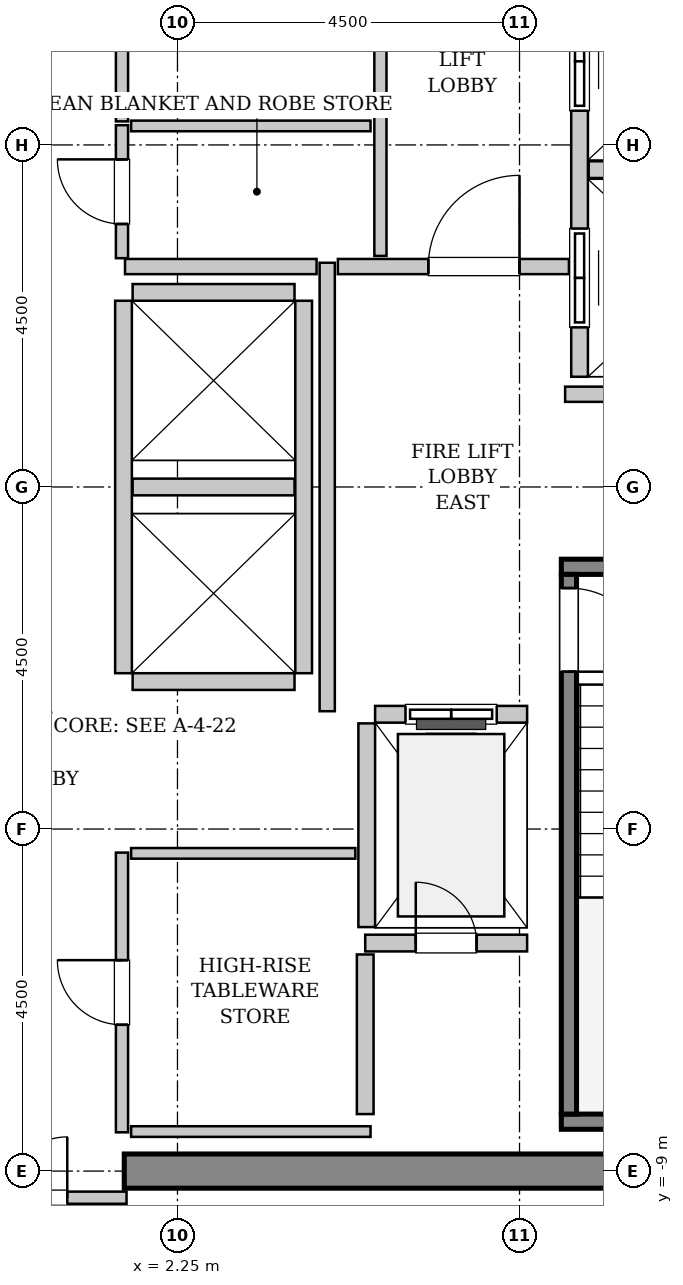
"""IFC4 building model, lengths in metres.
Left out: names, types, materials, properties, quantities, classifications, styles, units other than length and angle.
Written with IfcOpenShell. Run it as: python <this file> out.ifc"""

import sys

from ifc_helpers import new_model, si_unit, direction, frame, frame_2d, origin, place, context, subcontext, project, spatial, rectangle, extrude, source, transform, mapped, element, fill, save


model = new_model("IFC4")
c1 = context("Model", 3, precision=1e-05, world=origin(), true_north=direction((0.0, 1.0)))
c2 = subcontext(c1, "Body", "Model", "MODEL_VIEW")
j1 = project(units=[si_unit("LENGTHUNIT", "METRE"), si_unit("PLANEANGLEUNIT", "RADIAN")], contexts=[c1])
p1 = place(None, origin())
s1 = spatial("IfcSite", under=j1, at=p1, CompositionType="ELEMENT")
p2 = place(p1, origin())
s2 = spatial("IfcBuilding", under=s1, at=p2, CompositionType="ELEMENT")
p3 = place(p2, frame((0.0, 0.0, 314.0)))
s3 = spatial("IfcBuildingStorey", under=s2, at=p3, CompositionType="ELEMENT", Elevation=314.0)
m1 = source(origin(), c2, "Body", "SweptSolid", [
    extrude(rectangle(XDim=9.925, YDim=0.45, at=frame_2d((4.962, 0.0))), origin(), (0.0, 0.0, 1.0), 3.8),
])
p4 = place(p3, frame((1.55, -9.0, 0.0), z_axis=(0.0, 0.0, 1.0), x_axis=(1.0, 0.0, 0.0)))
e1 = element("IfcWall", 1, at=p4, inside=s3, PredefinedType="SHEAR", context=c2, shape_type="MappedRepresentation", body=[
    mapped(m1, transform((0.0, 0.0, 0.0), x_axis=(1.0, 0.0, 0.0), y_axis=(0.0, 1.0, 0.0), z_axis=(0.0, 0.0, 1.0), scale=1.0)),
])
m2 = source(origin(), c2, "Body", "SweptSolid", [
    extrude(rectangle(XDim=3.4, YDim=0.2, at=frame_2d((1.7, 0.0))), origin(), (0.0, 0.0, 1.0), 3.8),
])
p5 = place(p3, frame((7.3, -1.05, 0.0), z_axis=(0.0, 0.0, 1.0), x_axis=(1.0, 0.0, 0.0)))
e2 = element("IfcWall", 2, at=p5, inside=s3, PredefinedType="SOLIDWALL", context=c2, shape_type="MappedRepresentation", body=[
    mapped(m2, transform((0.0, 0.0, 0.0), x_axis=(1.0, 0.0, 0.0), y_axis=(0.0, 1.0, 0.0), z_axis=(0.0, 0.0, 1.0), scale=1.0)),
])
m3 = source(origin(), c2, "Body", "SweptSolid", [
    extrude(rectangle(XDim=3.73, YDim=0.2, at=frame_2d((1.865, 0.0))), origin(), (0.0, 0.0, 1.0), 3.8),
])
p6 = place(p3, frame((7.3, -8.35, 0.0), z_axis=(0.0, 0.0, 1.0), x_axis=(1.0, 0.0, 0.0)))
e3 = element("IfcWall", 3, at=p6, inside=s3, PredefinedType="SOLIDWALL", context=c2, shape_type="MappedRepresentation", body=[
    mapped(m3, transform((0.0, 0.0, 0.0), x_axis=(1.0, 0.0, 0.0), y_axis=(0.0, 1.0, 0.0), z_axis=(0.0, 0.0, 1.0), scale=1.0)),
])
m4 = source(origin(), c2, "Body", "SweptSolid", [
    extrude(rectangle(XDim=7.1, YDim=0.2, at=frame_2d((3.55, 0.0))), origin(), (0.0, 0.0, 1.0), 3.8),
])
p7 = place(p3, frame((7.4, -1.15, 0.0), z_axis=(0.0, 0.0, 1.0), x_axis=(0.0, -1.0, 0.0)))
e4 = element("IfcWall", 4, at=p7, inside=s3, PredefinedType="SOLIDWALL", context=c2, shape_type="MappedRepresentation", body=[
    mapped(m4, transform((0.0, 0.0, 0.0), x_axis=(1.0, 0.0, 0.0), y_axis=(0.0, 1.0, 0.0), z_axis=(0.0, 0.0, 1.0), scale=1.0)),
])
p8 = place(p7, frame((0.18, 0.0, 0.0)))
e5 = element("IfcOpeningElement", 5, at=p8, cuts=e4, PredefinedType="OPENING", context=c2, shape_type="SweptSolid", body=[
    extrude(rectangle(XDim=1.1, YDim=2.15, at=frame_2d((0.55, 1.075))), frame((0.0, 0.11, 0.0), z_axis=(0.0, -1.0, 0.0), x_axis=(1.0, 0.0, 0.0)), (0.0, 0.0, 1.0), 0.22),
])
m5 = source(origin(), c2, "Body", "SweptSolid", [
    extrude(rectangle(XDim=2.0, YDim=0.22, at=frame_2d((1.0, 0.0))), origin(), (0.0, 0.0, 1.0), 3.485),
])
p9 = place(p3, frame((6.85, -2.99, 0.0), z_axis=(0.0, 0.0, 1.0), x_axis=(-1.0, 0.0, 0.0)))
e6 = element("IfcWall", 6, at=p9, inside=s3, PredefinedType="SOLIDWALL", context=c2, shape_type="MappedRepresentation", body=[
    mapped(m5, transform((0.0, 0.0, 0.0), x_axis=(1.0, 0.0, 0.0), y_axis=(0.0, 1.0, 0.0), z_axis=(0.0, 0.0, 1.0), scale=1.0)),
])
p10 = place(p9, frame((0.4, 0.0, 0.0)))
e7 = element("IfcOpeningElement", 7, at=p10, cuts=e6, PredefinedType="OPENING", context=c2, shape_type="SweptSolid", body=[
    extrude(rectangle(XDim=1.2, YDim=2.2, at=frame_2d((0.6, 1.1))), frame((0.0, 0.12, 0.0), z_axis=(0.0, -1.0, 0.0), x_axis=(1.0, 0.0, 0.0)), (0.0, 0.0, 1.0), 0.24),
])
m6 = source(origin(), c2, "Body", "SweptSolid", [
    extrude(rectangle(XDim=2.68, YDim=0.22, at=frame_2d((1.34, 0.0))), origin(), (0.0, 0.0, 1.0), 3.485),
])
p11 = place(p3, frame((4.74, -3.11, 0.0), z_axis=(0.0, 0.0, 1.0), x_axis=(0.0, -1.0, 0.0)))
e8 = element("IfcWall", 8, at=p11, inside=s3, PredefinedType="SOLIDWALL", context=c2, shape_type="MappedRepresentation", body=[
    mapped(m6, transform((0.0, 0.0, 0.0), x_axis=(1.0, 0.0, 0.0), y_axis=(0.0, 1.0, 0.0), z_axis=(0.0, 0.0, 1.0), scale=1.0)),
])
m7 = source(origin(), c2, "Body", "SweptSolid", [
    extrude(rectangle(XDim=5.45, YDim=0.22, at=frame_2d((2.725, 0.0))), origin(), (0.0, 0.0, 1.0), 3.485),
])
p12 = place(p3, frame((7.54, 6.9, 0.0), z_axis=(0.0, 0.0, 1.0), x_axis=(0.0, -1.0, 0.0)))
e9 = element("IfcWall", 9, at=p12, inside=s3, PredefinedType="SOLIDWALL", context=c2, shape_type="MappedRepresentation", body=[
    mapped(m7, transform((0.0, 0.0, 0.0), x_axis=(1.0, 0.0, 0.0), y_axis=(0.0, 1.0, 0.0), z_axis=(0.0, 0.0, 1.0), scale=1.0)),
])
p13 = place(p12, frame((3.5, 0.0, 0.0)))
e10 = element("IfcOpeningElement", 10, at=p13, cuts=e9, PredefinedType="OPENING", context=c2, shape_type="SweptSolid", body=[
    extrude(rectangle(XDim=1.3, YDim=2.3, at=frame_2d((0.65, 1.15))), frame((0.0, 0.12, 0.0), z_axis=(0.0, -1.0, 0.0), x_axis=(1.0, 0.0, 0.0)), (0.0, 0.0, 1.0), 0.24),
])
p14 = place(p12, frame((0.65, 0.0, 0.0)))
e11 = element("IfcOpeningElement", 11, at=p14, cuts=e9, PredefinedType="OPENING", context=c2, shape_type="SweptSolid", body=[
    extrude(rectangle(XDim=1.3, YDim=2.3, at=frame_2d((0.65, 1.15))), frame((0.0, 0.12, 0.0), z_axis=(0.0, -1.0, 0.0), x_axis=(1.0, 0.0, 0.0)), (0.0, 0.0, 1.0), 0.24),
])
m8 = source(origin(), c2, "Body", "SweptSolid", [
    extrude(rectangle(XDim=2.78, YDim=0.22, at=frame_2d((1.39, 0.0))), origin(), (0.0, 0.0, 1.0), 3.485),
])
p15 = place(p3, frame((7.66, 4.175, 0.0), z_axis=(0.0, 0.0, 1.0), x_axis=(1.0, 0.0, 0.0)))
e12 = element("IfcWall", 12, at=p15, inside=s3, PredefinedType="SOLIDWALL", context=c2, shape_type="MappedRepresentation", body=[
    mapped(m8, transform((0.0, 0.0, 0.0), x_axis=(1.0, 0.0, 0.0), y_axis=(0.0, 1.0, 0.0), z_axis=(0.0, 0.0, 1.0), scale=1.0)),
])
m9 = source(origin(), c2, "Body", "SweptSolid", [
    extrude(rectangle(XDim=4.9, YDim=0.22, at=frame_2d((2.45, 0.0))), origin(), (0.0, 0.0, 1.0), 3.485),
])
for number, where, z_axis, x_axis in (
    (13, (1.54, 2.45, 0.0), (0.0, 0.0, 1.0), (0.0, -1.0, 0.0)),
    (14, (3.91, -2.45, 0.0), (0.0, 0.0, 1.0), (0.0, 1.0, 0.0)),
):
    element("IfcWall", number, at=place(p3, frame(where, z_axis=z_axis, x_axis=x_axis)), inside=s3, PredefinedType="SOLIDWALL", context=c2, shape_type="MappedRepresentation", body=[
        mapped(m9, transform((0.0, 0.0, 0.0), x_axis=(1.0, 0.0, 0.0), y_axis=(0.0, 1.0, 0.0), z_axis=(0.0, 0.0, 1.0), scale=1.0)),
    ])
m10 = source(origin(), c2, "Body", "SweptSolid", [
    extrude(rectangle(XDim=2.13, YDim=0.22, at=frame_2d((1.065, 0.0))), origin(), (0.0, 0.0, 1.0), 3.485),
])
for number, where, z_axis, x_axis in (
    (15, (1.66, -2.56, 0.0), (0.0, 0.0, 1.0), (1.0, 0.0, 0.0)),
    (16, (1.66, 0.0, 0.0), (0.0, 0.0, 1.0), (1.0, 0.0, 0.0)),
    (17, (3.79, 2.56, 0.0), (0.0, 0.0, 1.0), (-1.0, 0.0, 0.0)),
):
    element("IfcWall", number, at=place(p3, frame(where, z_axis=z_axis, x_axis=x_axis)), inside=s3, PredefinedType="SOLIDWALL", context=c2, shape_type="MappedRepresentation", body=[
        mapped(m10, transform((0.0, 0.0, 0.0), x_axis=(1.0, 0.0, 0.0), y_axis=(0.0, 1.0, 0.0), z_axis=(0.0, 0.0, 1.0), scale=1.0)),
    ])
p16 = place(p3, frame((4.72, -6.0, 0.0), z_axis=(0.0, 0.0, 1.0), x_axis=(1.0, 0.0, 0.0)))
e18 = element("IfcWall", 18, at=p16, inside=s3, PredefinedType="SOLIDWALL", context=c2, shape_type="MappedRepresentation", body=[
    mapped(m10, transform((0.0, 0.0, 0.0), x_axis=(1.0, 0.0, 0.0), y_axis=(0.0, 1.0, 0.0), z_axis=(0.0, 0.0, 1.0), scale=1.0)),
])
p17 = place(p16, frame((0.665, 0.0, 0.0)))
e19 = element("IfcOpeningElement", 19, at=p17, cuts=e18, PredefinedType="OPENING", context=c2, shape_type="SweptSolid", body=[
    extrude(rectangle(XDim=0.8, YDim=2.0, at=frame_2d((0.4, 1.0))), frame((0.0, 0.12, 0.0), z_axis=(0.0, -1.0, 0.0), x_axis=(1.0, 0.0, 0.0)), (0.0, 0.0, 1.0), 0.24),
])
m11 = source(origin(), c2, "Body", "SweptSolid", [
    extrude(rectangle(XDim=2.1, YDim=0.22, at=frame_2d((1.05, 0.0))), origin(), (0.0, 0.0, 1.0), 3.485),
])
p18 = place(p3, frame((4.72, -8.25, 0.0), z_axis=(0.0, 0.0, 1.0), x_axis=(0.0, 1.0, 0.0)))
e20 = element("IfcWall", 20, at=p18, inside=s3, PredefinedType="SOLIDWALL", context=c2, shape_type="MappedRepresentation", body=[
    mapped(m11, transform((0.0, 0.0, 0.0), x_axis=(1.0, 0.0, 0.0), y_axis=(0.0, 1.0, 0.0), z_axis=(0.0, 0.0, 1.0), scale=1.0)),
])
m12 = source(origin(), c2, "Body", "SweptSolid", [
    extrude(rectangle(XDim=5.9, YDim=0.2, at=frame_2d((2.95, 0.0))), origin(), (0.0, 0.0, 1.0), 3.485),
])
p19 = place(p3, frame((4.22, -2.95, 0.0), z_axis=(0.0, 0.0, 1.0), x_axis=(0.0, 1.0, 0.0)))
e21 = element("IfcWall", 21, at=p19, inside=s3, PredefinedType="PARTITIONING", context=c2, shape_type="MappedRepresentation", body=[
    mapped(m12, transform((0.0, 0.0, 0.0), x_axis=(1.0, 0.0, 0.0), y_axis=(0.0, 1.0, 0.0), z_axis=(0.0, 0.0, 1.0), scale=1.0)),
])
m13 = source(origin(), c2, "Body", "SweptSolid", [
    extrude(rectangle(XDim=2.52, YDim=0.2, at=frame_2d((1.26, 0.0))), origin(), (0.0, 0.0, 1.0), 3.485),
])
p20 = place(p3, frame((1.56, 2.9, 0.0), z_axis=(0.0, 0.0, 1.0), x_axis=(1.0, 0.0, 0.0)))
e22 = element("IfcWall", 22, at=p20, inside=s3, PredefinedType="PARTITIONING", context=c2, shape_type="MappedRepresentation", body=[
    mapped(m13, transform((0.0, 0.0, 0.0), x_axis=(1.0, 0.0, 0.0), y_axis=(0.0, 1.0, 0.0), z_axis=(0.0, 0.0, 1.0), scale=1.0)),
])
m14 = source(origin(), c2, "Body", "SweptSolid", [
    extrude(rectangle(XDim=3.04, YDim=0.2, at=frame_2d((1.52, 0.0))), origin(), (0.0, 0.0, 1.0), 3.485),
])
p21 = place(p3, frame((4.36, 2.9, 0.0), z_axis=(0.0, 0.0, 1.0), x_axis=(1.0, 0.0, 0.0)))
e23 = element("IfcWall", 23, at=p21, inside=s3, PredefinedType="PARTITIONING", context=c2, shape_type="MappedRepresentation", body=[
    mapped(m14, transform((0.0, 0.0, 0.0), x_axis=(1.0, 0.0, 0.0), y_axis=(0.0, 1.0, 0.0), z_axis=(0.0, 0.0, 1.0), scale=1.0)),
])
p22 = place(p21, frame((1.19, 0.0, 0.0)))
e24 = element("IfcOpeningElement", 24, at=p22, cuts=e23, PredefinedType="OPENING", context=c2, shape_type="SweptSolid", body=[
    extrude(rectangle(XDim=1.2, YDim=2.15, at=frame_2d((0.6, 1.075))), frame((0.0, 0.11, 0.0), z_axis=(0.0, -1.0, 0.0), x_axis=(1.0, 0.0, 0.0)), (0.0, 0.0, 1.0), 0.22),
])
m15 = source(origin(), c2, "Body", "SweptSolid", [
    extrude(rectangle(XDim=4.11, YDim=0.2, at=frame_2d((2.055, 0.0))), origin(), (0.0, 0.0, 1.0), 3.485),
])
p23 = place(p3, frame((7.35, 1.22, 0.0), z_axis=(0.0, 0.0, 1.0), x_axis=(1.0, 0.0, 0.0)))
e25 = element("IfcWall", 25, at=p23, inside=s3, PredefinedType="PARTITIONING", context=c2, shape_type="MappedRepresentation", body=[
    mapped(m15, transform((0.0, 0.0, 0.0), x_axis=(1.0, 0.0, 0.0), y_axis=(0.0, 1.0, 0.0), z_axis=(0.0, 0.0, 1.0), scale=1.0)),
])
m16 = source(origin(), c2, "Body", "SweptSolid", [
    extrude(rectangle(XDim=3.16, YDim=0.16, at=frame_2d((1.58, 0.0))), origin(), (0.0, 0.0, 1.0), 2.575),
])
p24 = place(p3, frame((-1.58, -9.35, 0.0), z_axis=(0.0, 0.0, 1.0), x_axis=(1.0, 0.0, 0.0)))
e26 = element("IfcWall", 26, at=p24, inside=s3, PredefinedType="PARTITIONING", context=c2, shape_type="MappedRepresentation", body=[
    mapped(m16, transform((0.0, 0.0, 0.0), x_axis=(1.0, 0.0, 0.0), y_axis=(0.0, 1.0, 0.0), z_axis=(0.0, 0.0, 1.0), scale=1.0)),
])
p25 = place(p24, frame((0.78, 0.0, 0.0)))
e27 = element("IfcOpeningElement", 27, at=p25, cuts=e26, PredefinedType="OPENING", context=c2, shape_type="SweptSolid", body=[
    extrude(rectangle(XDim=1.6, YDim=2.3, at=frame_2d((0.8, 1.15))), frame((0.0, 0.09, 0.0), z_axis=(0.0, -1.0, 0.0), x_axis=(1.0, 0.0, 0.0)), (0.0, 0.0, 1.0), 0.18),
])
m17 = source(origin(), c2, "Body", "SweptSolid", [
    extrude(rectangle(XDim=5.45, YDim=0.16, at=frame_2d((2.725, 0.0))), origin(), (0.0, 0.0, 1.0), 3.485),
])
p26 = place(p3, frame((4.92, 3.04, 0.0), z_axis=(0.0, 0.0, 1.0), x_axis=(0.0, 1.0, 0.0)))
e28 = element("IfcWall", 28, at=p26, inside=s3, PredefinedType="PARTITIONING", context=c2, shape_type="MappedRepresentation", body=[
    mapped(m17, transform((0.0, 0.0, 0.0), x_axis=(1.0, 0.0, 0.0), y_axis=(0.0, 1.0, 0.0), z_axis=(0.0, 0.0, 1.0), scale=1.0)),
])
m18 = source(origin(), c2, "Body", "SweptSolid", [
    extrude(rectangle(XDim=1.75, YDim=0.16, at=frame_2d((0.875, 0.0))), origin(), (0.0, 0.0, 1.0), 3.485),
])
p27 = place(p3, frame((1.52, 3.01, 0.0), z_axis=(0.0, 0.0, 1.0), x_axis=(0.0, 1.0, 0.0)))
e29 = element("IfcWall", 29, at=p27, inside=s3, PredefinedType="PARTITIONING", context=c2, shape_type="MappedRepresentation", body=[
    mapped(m18, transform((0.0, 0.0, 0.0), x_axis=(1.0, 0.0, 0.0), y_axis=(0.0, 1.0, 0.0), z_axis=(0.0, 0.0, 1.0), scale=1.0)),
])
p28 = place(p27, frame((0.45, 0.0, 0.0)))
e30 = element("IfcOpeningElement", 30, at=p28, cuts=e29, PredefinedType="OPENING", context=c2, shape_type="SweptSolid", body=[
    extrude(rectangle(XDim=0.85, YDim=2.1, at=frame_2d((0.425, 1.05))), frame((0.0, 0.09, 0.0), z_axis=(0.0, -1.0, 0.0), x_axis=(1.0, 0.0, 0.0)), (0.0, 0.0, 1.0), 0.18),
])
m19 = source(origin(), c2, "Body", "SweptSolid", [
    extrude(rectangle(XDim=3.15, YDim=0.14, at=frame_2d((1.575, 0.0))), origin(), (0.0, 0.0, 1.0), 3.485),
])
p29 = place(p3, frame((1.64, 4.75, 0.0), z_axis=(0.0, 0.0, 1.0), x_axis=(1.0, 0.0, 0.0)))
e31 = element("IfcWall", 31, at=p29, inside=s3, PredefinedType="PARTITIONING", context=c2, shape_type="MappedRepresentation", body=[
    mapped(m19, transform((0.0, 0.0, 0.0), x_axis=(1.0, 0.0, 0.0), y_axis=(0.0, 1.0, 0.0), z_axis=(0.0, 0.0, 1.0), scale=1.0)),
])
m20 = source(origin(), c2, "Body", "SweptSolid", [
    extrude(rectangle(XDim=3.68, YDim=0.16, at=frame_2d((1.84, 0.0))), origin(), (0.0, 0.0, 1.0), 3.485),
])
p30 = place(p3, frame((1.52, 4.81, 0.0), z_axis=(0.0, 0.0, 1.0), x_axis=(0.0, 1.0, 0.0)))
e32 = element("IfcWall", 32, at=p30, inside=s3, PredefinedType="PARTITIONING", context=c2, shape_type="MappedRepresentation", body=[
    mapped(m20, transform((0.0, 0.0, 0.0), x_axis=(1.0, 0.0, 0.0), y_axis=(0.0, 1.0, 0.0), z_axis=(0.0, 0.0, 1.0), scale=1.0)),
])
p31 = place(p30, frame((1.415, 0.0, 0.0)))
e33 = element("IfcOpeningElement", 33, at=p31, cuts=e32, PredefinedType="OPENING", context=c2, shape_type="SweptSolid", body=[
    extrude(rectangle(XDim=0.85, YDim=2.1, at=frame_2d((0.425, 1.05))), frame((0.0, 0.09, 0.0), z_axis=(0.0, -1.0, 0.0), x_axis=(1.0, 0.0, 0.0)), (0.0, 0.0, 1.0), 0.18),
])
p32 = place(p3, frame((1.52, -8.49, 0.0), z_axis=(0.0, 0.0, 1.0), x_axis=(0.0, 1.0, 0.0)))
e34 = element("IfcWall", 34, at=p32, inside=s3, PredefinedType="PARTITIONING", context=c2, shape_type="MappedRepresentation", body=[
    mapped(m20, transform((0.0, 0.0, 0.0), x_axis=(1.0, 0.0, 0.0), y_axis=(0.0, 1.0, 0.0), z_axis=(0.0, 0.0, 1.0), scale=1.0)),
])
p33 = place(p32, frame((1.415, 0.0, 0.0)))
e35 = element("IfcOpeningElement", 35, at=p33, cuts=e34, PredefinedType="OPENING", context=c2, shape_type="SweptSolid", body=[
    extrude(rectangle(XDim=0.85, YDim=2.1, at=frame_2d((0.425, 1.05))), frame((0.0, 0.09, 0.0), z_axis=(0.0, -1.0, 0.0), x_axis=(1.0, 0.0, 0.0)), (0.0, 0.0, 1.0), 0.18),
])
m21 = source(origin(), c2, "Body", "SweptSolid", [
    extrude(rectangle(XDim=2.95, YDim=0.14, at=frame_2d((1.475, 0.0))), origin(), (0.0, 0.0, 1.0), 3.485),
])
p34 = place(p3, frame((1.64, -4.82, 0.0), z_axis=(0.0, 0.0, 1.0), x_axis=(1.0, 0.0, 0.0)))
e36 = element("IfcWall", 36, at=p34, inside=s3, PredefinedType="PARTITIONING", context=c2, shape_type="MappedRepresentation", body=[
    mapped(m21, transform((0.0, 0.0, 0.0), x_axis=(1.0, 0.0, 0.0), y_axis=(0.0, 1.0, 0.0), z_axis=(0.0, 0.0, 1.0), scale=1.0)),
])
p35 = place(p3, frame((1.64, -8.48, 0.0), z_axis=(0.0, 0.0, 1.0), x_axis=(1.0, 0.0, 0.0)))
e37 = element("IfcWall", 37, at=p35, inside=s3, PredefinedType="PARTITIONING", context=c2, shape_type="MappedRepresentation", body=[
    mapped(m19, transform((0.0, 0.0, 0.0), x_axis=(1.0, 0.0, 0.0), y_axis=(0.0, 1.0, 0.0), z_axis=(0.0, 0.0, 1.0), scale=1.0)),
])
m22 = source(origin(), c2, "Body", "SweptSolid", [
    extrude(rectangle(XDim=1.1, YDim=2.15, at=frame_2d((0.55, 1.075))), frame((0.0, 0.025, 0.0), z_axis=(0.0, -1.0, 0.0), x_axis=(1.0, 0.0, 0.0)), (0.0, 0.0, 1.0), 0.05),
])
p36 = place(p8, origin())
e38 = element("IfcDoor", 38, at=p36, inside=s3, OperationType="SINGLE_SWING_RIGHT", PredefinedType="DOOR", context=c2, shape_type="MappedRepresentation", body=[
    mapped(m22, transform((0.0, 0.0, 0.0), x_axis=(1.0, 0.0, 0.0), y_axis=(0.0, 1.0, 0.0), z_axis=(0.0, 0.0, 1.0), scale=1.0)),
])
fill(e5, e38)
m23 = source(origin(), c2, "Body", "SweptSolid", [
    extrude(rectangle(XDim=1.2, YDim=2.2, at=frame_2d((0.6, 1.1))), frame((0.0, 0.025, 0.0), z_axis=(0.0, -1.0, 0.0), x_axis=(1.0, 0.0, 0.0)), (0.0, 0.0, 1.0), 0.05),
])
p37 = place(p10, origin())
e39 = element("IfcDoor", 39, at=p37, inside=s3, OperationType="SLIDING_TO_LEFT", PredefinedType="DOOR", context=c2, shape_type="MappedRepresentation", body=[
    mapped(m23, transform((0.0, 0.0, 0.0), x_axis=(1.0, 0.0, 0.0), y_axis=(0.0, 1.0, 0.0), z_axis=(0.0, 0.0, 1.0), scale=1.0)),
])
fill(e7, e39)
m24 = source(origin(), c2, "Body", "SweptSolid", [
    extrude(rectangle(XDim=1.3, YDim=2.3, at=frame_2d((0.65, 1.15))), frame((0.0, 0.025, 0.0), z_axis=(0.0, -1.0, 0.0), x_axis=(1.0, 0.0, 0.0)), (0.0, 0.0, 1.0), 0.05),
])
p38 = place(p13, origin())
e40 = element("IfcDoor", 40, at=p38, inside=s3, OperationType="SLIDING_TO_RIGHT", PredefinedType="DOOR", context=c2, shape_type="MappedRepresentation", body=[
    mapped(m24, transform((0.0, 0.0, 0.0), x_axis=(1.0, 0.0, 0.0), y_axis=(0.0, 1.0, 0.0), z_axis=(0.0, 0.0, 1.0), scale=1.0)),
])
fill(e10, e40)
p39 = place(p14, origin())
e41 = element("IfcDoor", 41, at=p39, inside=s3, OperationType="SLIDING_TO_RIGHT", PredefinedType="DOOR", context=c2, shape_type="MappedRepresentation", body=[
    mapped(m24, transform((0.0, 0.0, 0.0), x_axis=(1.0, 0.0, 0.0), y_axis=(0.0, 1.0, 0.0), z_axis=(0.0, 0.0, 1.0), scale=1.0)),
])
fill(e11, e41)
m25 = source(origin(), c2, "Body", "SweptSolid", [
    extrude(rectangle(XDim=0.8, YDim=2.0, at=frame_2d((0.4, 1.0))), frame((0.0, 0.025, 0.0), z_axis=(0.0, -1.0, 0.0), x_axis=(1.0, 0.0, 0.0)), (0.0, 0.0, 1.0), 0.05),
])
p40 = place(p17, origin())
e42 = element("IfcDoor", 42, at=p40, inside=s3, OperationType="SINGLE_SWING_LEFT", PredefinedType="TRAPDOOR", context=c2, shape_type="MappedRepresentation", body=[
    mapped(m25, transform((0.0, 0.0, 0.0), x_axis=(1.0, 0.0, 0.0), y_axis=(0.0, 1.0, 0.0), z_axis=(0.0, 0.0, 1.0), scale=1.0)),
])
fill(e19, e42)
m26 = source(origin(), c2, "Body", "SweptSolid", [
    extrude(rectangle(XDim=1.2, YDim=2.15, at=frame_2d((0.6, 1.075))), frame((0.0, 0.025, 0.0), z_axis=(0.0, -1.0, 0.0), x_axis=(1.0, 0.0, 0.0)), (0.0, 0.0, 1.0), 0.05),
])
p41 = place(p22, origin())
e43 = element("IfcDoor", 43, at=p41, inside=s3, OperationType="SINGLE_SWING_RIGHT", PredefinedType="DOOR", context=c2, shape_type="MappedRepresentation", body=[
    mapped(m26, transform((0.0, 0.0, 0.0), x_axis=(1.0, 0.0, 0.0), y_axis=(0.0, 1.0, 0.0), z_axis=(0.0, 0.0, 1.0), scale=1.0)),
])
fill(e24, e43)
m27 = source(origin(), c2, "Body", "SweptSolid", [
    extrude(rectangle(XDim=1.6, YDim=2.3, at=frame_2d((0.8, 1.15))), frame((0.0, 0.025, 0.0), z_axis=(0.0, -1.0, 0.0), x_axis=(1.0, 0.0, 0.0)), (0.0, 0.0, 1.0), 0.05),
])
p42 = place(p25, origin())
e44 = element("IfcDoor", 44, at=p42, inside=s3, OperationType="DOUBLE_DOOR_SINGLE_SWING", PredefinedType="DOOR", context=c2, shape_type="MappedRepresentation", body=[
    mapped(m27, transform((0.0, 0.0, 0.0), x_axis=(1.0, 0.0, 0.0), y_axis=(0.0, 1.0, 0.0), z_axis=(0.0, 0.0, 1.0), scale=1.0)),
])
fill(e27, e44)
m28 = source(origin(), c2, "Body", "SweptSolid", [
    extrude(rectangle(XDim=0.85, YDim=2.1, at=frame_2d((0.425, 1.05))), frame((0.0, 0.025, 0.0), z_axis=(0.0, -1.0, 0.0), x_axis=(1.0, 0.0, 0.0)), (0.0, 0.0, 1.0), 0.05),
])
p43 = place(p28, origin())
e45 = element("IfcDoor", 45, at=p43, inside=s3, OperationType="SINGLE_SWING_RIGHT", PredefinedType="DOOR", context=c2, shape_type="MappedRepresentation", body=[
    mapped(m28, transform((0.0, 0.0, 0.0), x_axis=(1.0, 0.0, 0.0), y_axis=(0.0, 1.0, 0.0), z_axis=(0.0, 0.0, 1.0), scale=1.0)),
])
fill(e30, e45)
p44 = place(p33, origin())
e46 = element("IfcDoor", 46, at=p44, inside=s3, OperationType="SINGLE_SWING_RIGHT", PredefinedType="DOOR", context=c2, shape_type="MappedRepresentation", body=[
    mapped(m28, transform((0.0, 0.0, 0.0), x_axis=(1.0, 0.0, 0.0), y_axis=(0.0, 1.0, 0.0), z_axis=(0.0, 0.0, 1.0), scale=1.0)),
])
fill(e35, e46)
save(model, sys.argv[1])
